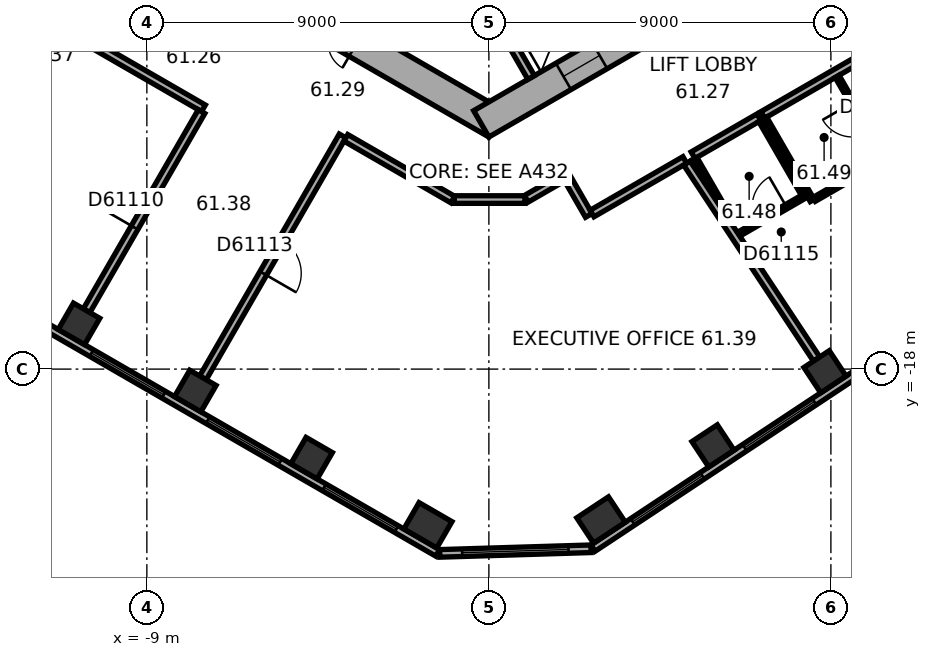
"""IFC4 building model, lengths in metres.
Left out: names, types, materials, properties, quantities, classifications, styles, units other than length and angle.
Written with IfcOpenShell. Run it as: python <this file> out.ifc"""

import sys

from ifc_helpers import new_model, si_unit, direction, frame, frame_2d, origin, origin_2d, place, context, subcontext, project, spatial, rectangle, extrude, element, fill, save


model = new_model("IFC4")
c1 = context("Model", 3, precision=1e-05, world=origin(), true_north=direction((0.0, 1.0)))
c2 = subcontext(c1, "Body", "Model", "MODEL_VIEW")
j1 = project(units=[si_unit("LENGTHUNIT", "METRE"), si_unit("PLANEANGLEUNIT", "RADIAN")], contexts=[c1])
p1 = place(None, origin())
s1 = spatial("IfcSite", under=j1, at=p1, CompositionType="ELEMENT")
p2 = place(p1, origin())
s2 = spatial("IfcBuilding", under=s1, at=p2, CompositionType="ELEMENT")
p3 = place(p2, frame((0.0, 0.0, 247.6)))
s3 = spatial("IfcBuildingStorey", under=s2, at=p3, CompositionType="ELEMENT", Elevation=247.6)
for number, where, z_axis, x_axis in (
    (1, (-10.785, -16.809, 0.0), (0.0, 0.0, 1.0), (0.866, -0.5, 0.0)),
    (2, (-7.725, -18.576, 0.0), (0.0, 0.0, 1.0), (0.866, -0.5, 0.0)),
    (3, (-4.665, -20.343, 0.0), (0.0, 0.0, 1.0), (0.866, -0.5, 0.0)),
):
    element("IfcColumn", number, at=place(p3, frame(where, z_axis=z_axis, x_axis=x_axis)), inside=s3, PredefinedType="COLUMN", context=c2, shape_type="SweptSolid", body=[
        extrude(rectangle(XDim=0.8, YDim=0.8, at=origin_2d()), origin(), (0.0, 0.0, 1.0), 3.7),
    ])
for number, where, z_axis, x_axis in (
    (4, (-1.604, -22.11, 0.0), (0.0, 0.0, 1.0), (0.866, -0.5, 0.0)),
    (5, (2.951, -21.971, 0.0), (0.0, 0.0, 1.0), (0.834, 0.552, 0.0)),
):
    element("IfcColumn", number, at=place(p3, frame(where, z_axis=z_axis, x_axis=x_axis)), inside=s3, PredefinedType="COLUMN", context=c2, shape_type="SweptSolid", body=[
        extrude(rectangle(XDim=1.0, YDim=0.8, at=origin_2d()), origin(), (0.0, 0.0, 1.0), 3.7),
    ])
for number, where, z_axis, x_axis in (
    (6, (5.898, -20.021, 0.0), (0.0, 0.0, 1.0), (0.834, 0.552, 0.0)),
    (7, (8.844, -18.07, 0.0), (0.0, 0.0, 1.0), (0.834, 0.552, 0.0)),
):
    element("IfcColumn", number, at=place(p3, frame(where, z_axis=z_axis, x_axis=x_axis)), inside=s3, PredefinedType="COLUMN", context=c2, shape_type="SweptSolid", body=[
        extrude(rectangle(XDim=0.8, YDim=0.8, at=origin_2d()), origin(), (0.0, 0.0, 1.0), 3.7),
    ])
p4 = place(p3, frame((-10.1, -5.6, 0.0), z_axis=(0.0, 0.0, 1.0), x_axis=(0.866023897231, -0.500002609418, 0.0)))
e8 = element("IfcWall", 8, at=p4, inside=s3, PredefinedType="SHEAR", context=c2, shape_type="SweptSolid", body=[
    extrude(rectangle(XDim=11.894, YDim=0.8, at=frame_2d((5.947, 0.0))), origin(), (0.0, 0.0, 1.0), 3.7),
])
p5 = place(p4, frame((6.147, 0.0, 0.0)))
e9 = element("IfcOpeningElement", 9, at=p5, cuts=e8, PredefinedType="OPENING", context=c2, shape_type="SweptSolid", body=[
    extrude(rectangle(XDim=1.5, YDim=2.1, at=frame_2d((0.75, 1.05))), frame((0.0, 0.41, 0.0), z_axis=(0.0, -1.0, 0.0), x_axis=(1.0, 0.0, 0.0)), (0.0, 0.0, 1.0), 0.82),
])
p6 = place(p4, frame((1.597, 0.0, 0.0)))
e10 = element("IfcOpeningElement", 10, at=p6, cuts=e8, PredefinedType="OPENING", context=c2, shape_type="SweptSolid", body=[
    extrude(rectangle(XDim=1.1, YDim=2.1, at=frame_2d((0.55, 1.05))), frame((0.0, 0.41, 0.0), z_axis=(0.0, -1.0, 0.0), x_axis=(1.0, 0.0, 0.0)), (0.0, 0.0, 1.0), 0.82),
])
p7 = place(p4, frame((4.197, 0.0, 0.0)))
e11 = element("IfcOpeningElement", 11, at=p7, cuts=e8, PredefinedType="OPENING", context=c2, shape_type="SweptSolid", body=[
    extrude(rectangle(XDim=1.1, YDim=2.1, at=frame_2d((0.55, 1.05))), frame((0.0, 0.41, 0.0), z_axis=(0.0, -1.0, 0.0), x_axis=(1.0, 0.0, 0.0)), (0.0, 0.0, 1.0), 0.82),
])
p8 = place(p3, frame((-0.2, -11.547, 0.0), z_axis=(0.0, 0.0, 1.0), x_axis=(0.866023897231, 0.500002609418, 0.0)))
e12 = element("IfcWall", 12, at=p8, inside=s3, PredefinedType="SHEAR", context=c2, shape_type="SweptSolid", body=[
    extrude(rectangle(XDim=11.894, YDim=0.8, at=frame_2d((5.947, 0.0))), origin(), (0.0, 0.0, 1.0), 3.7),
])
p9 = place(p8, frame((2.497, 0.0, 0.0)))
e13 = element("IfcOpeningElement", 13, at=p9, cuts=e12, PredefinedType="OPENING", context=c2, shape_type="SweptSolid", body=[
    extrude(rectangle(XDim=1.1, YDim=2.1, at=frame_2d((0.55, 1.05))), frame((0.0, 0.41, 0.0), z_axis=(0.0, -1.0, 0.0), x_axis=(1.0, 0.0, 0.0)), (0.0, 0.0, 1.0), 0.82),
])
p10 = place(p8, frame((5.097, 0.0, 0.0)))
e14 = element("IfcOpeningElement", 14, at=p10, cuts=e12, PredefinedType="OPENING", context=c2, shape_type="SweptSolid", body=[
    extrude(rectangle(XDim=1.1, YDim=2.1, at=frame_2d((0.55, 1.05))), frame((0.0, 0.41, 0.0), z_axis=(0.0, -1.0, 0.0), x_axis=(1.0, 0.0, 0.0)), (0.0, 0.0, 1.0), 0.82),
])
p11 = place(p8, frame((7.697, 0.0, 0.0)))
e15 = element("IfcOpeningElement", 15, at=p11, cuts=e12, PredefinedType="OPENING", context=c2, shape_type="SweptSolid", body=[
    extrude(rectangle(XDim=1.1, YDim=2.1, at=frame_2d((0.55, 1.05))), frame((0.0, 0.41, 0.0), z_axis=(0.0, -1.0, 0.0), x_axis=(1.0, 0.0, 0.0)), (0.0, 0.0, 1.0), 0.82),
])
p12 = place(p3, frame((-17.664, -13.415, 0.0), z_axis=(0.0, 0.0, 1.0), x_axis=(0.866026555358, -0.49999800541, 0.0)))
e16 = element("IfcWall", 16, at=p12, inside=s3, PredefinedType="STANDARD", context=c2, shape_type="SweptSolid", body=[
    extrude(rectangle(XDim=18.841, YDim=0.2, at=frame_2d((9.421, 0.0))), origin(), (0.0, 0.0, 1.0), 3.7),
])
p13 = place(p12, frame((1.254, 0.0, 0.9)))
e17 = element("IfcOpeningElement", 17, at=p13, cuts=e16, PredefinedType="OPENING", context=c2, shape_type="SweptSolid", body=[
    extrude(rectangle(XDim=2.2, YDim=2.0, at=frame_2d((1.1, 1.0))), frame((0.0, 0.11, 0.0), z_axis=(0.0, -1.0, 0.0), x_axis=(1.0, 0.0, 0.0)), (0.0, 0.0, 1.0), 0.22),
])
p14 = place(p12, frame((4.788, 0.0, 0.9)))
e18 = element("IfcOpeningElement", 18, at=p14, cuts=e16, PredefinedType="OPENING", context=c2, shape_type="SweptSolid", body=[
    extrude(rectangle(XDim=2.2, YDim=2.0, at=frame_2d((1.1, 1.0))), frame((0.0, 0.11, 0.0), z_axis=(0.0, -1.0, 0.0), x_axis=(1.0, 0.0, 0.0)), (0.0, 0.0, 1.0), 0.22),
])
p15 = place(p12, frame((8.322, 0.0, 0.9)))
e19 = element("IfcOpeningElement", 19, at=p15, cuts=e16, PredefinedType="OPENING", context=c2, shape_type="SweptSolid", body=[
    extrude(rectangle(XDim=2.2, YDim=2.0, at=frame_2d((1.1, 1.0))), frame((0.0, 0.11, 0.0), z_axis=(0.0, -1.0, 0.0), x_axis=(1.0, 0.0, 0.0)), (0.0, 0.0, 1.0), 0.22),
])
p16 = place(p12, frame((11.855, 0.0, 0.9)))
e20 = element("IfcOpeningElement", 20, at=p16, cuts=e16, PredefinedType="OPENING", context=c2, shape_type="SweptSolid", body=[
    extrude(rectangle(XDim=2.2, YDim=2.0, at=frame_2d((1.1, 1.0))), frame((0.0, 0.11, 0.0), z_axis=(0.0, -1.0, 0.0), x_axis=(1.0, 0.0, 0.0)), (0.0, 0.0, 1.0), 0.22),
])
p17 = place(p12, frame((15.389, 0.0, 0.9)))
e21 = element("IfcOpeningElement", 21, at=p17, cuts=e16, PredefinedType="OPENING", context=c2, shape_type="SweptSolid", body=[
    extrude(rectangle(XDim=2.2, YDim=2.0, at=frame_2d((1.1, 1.0))), frame((0.0, 0.11, 0.0), z_axis=(0.0, -1.0, 0.0), x_axis=(1.0, 0.0, 0.0)), (0.0, 0.0, 1.0), 0.22),
])
p18 = place(p3, frame((-1.294, -22.849, 0.0), z_axis=(0.0, 0.0, 1.0), x_axis=(0.999533952558, 0.030526671678, 0.0)))
e22 = element("IfcWall", 22, at=p18, inside=s3, PredefinedType="STANDARD", context=c2, shape_type="SweptSolid", body=[
    extrude(rectangle(XDim=3.983, YDim=0.2, at=frame_2d((1.991, 0.0))), origin(), (0.0, 0.0, 1.0), 3.7),
])
p19 = place(p18, frame((0.591, 0.0, 0.9)))
e23 = element("IfcOpeningElement", 23, at=p19, cuts=e22, PredefinedType="OPENING", context=c2, shape_type="SweptSolid", body=[
    extrude(rectangle(XDim=2.8, YDim=2.0, at=frame_2d((1.4, 1.0))), frame((0.0, 0.11, 0.0), z_axis=(0.0, -1.0, 0.0), x_axis=(1.0, 0.0, 0.0)), (0.0, 0.0, 1.0), 0.22),
])
p20 = place(p3, frame((2.739, -22.711, 0.0), z_axis=(0.0, 0.0, 1.0), x_axis=(0.833885723098, 0.551937134838, 0.0)))
e24 = element("IfcWall", 24, at=p20, inside=s3, PredefinedType="STANDARD", context=c2, shape_type="SweptSolid", body=[
    extrude(rectangle(XDim=18.841, YDim=0.2, at=frame_2d((9.421, 0.0))), origin(), (0.0, 0.0, 1.0), 3.7),
])
p21 = place(p20, frame((1.252, 0.0, 0.9)))
e25 = element("IfcOpeningElement", 25, at=p21, cuts=e24, PredefinedType="OPENING", context=c2, shape_type="SweptSolid", body=[
    extrude(rectangle(XDim=2.2, YDim=2.0, at=frame_2d((1.1, 1.0))), frame((0.0, 0.11, 0.0), z_axis=(0.0, -1.0, 0.0), x_axis=(1.0, 0.0, 0.0)), (0.0, 0.0, 1.0), 0.22),
])
p22 = place(p20, frame((4.786, 0.0, 0.9)))
e26 = element("IfcOpeningElement", 26, at=p22, cuts=e24, PredefinedType="OPENING", context=c2, shape_type="SweptSolid", body=[
    extrude(rectangle(XDim=2.2, YDim=2.0, at=frame_2d((1.1, 1.0))), frame((0.0, 0.11, 0.0), z_axis=(0.0, -1.0, 0.0), x_axis=(1.0, 0.0, 0.0)), (0.0, 0.0, 1.0), 0.22),
])
p23 = place(p20, frame((8.32, 0.0, 0.9)))
e27 = element("IfcOpeningElement", 27, at=p23, cuts=e24, PredefinedType="OPENING", context=c2, shape_type="SweptSolid", body=[
    extrude(rectangle(XDim=2.2, YDim=2.0, at=frame_2d((1.1, 1.0))), frame((0.0, 0.11, 0.0), z_axis=(0.0, -1.0, 0.0), x_axis=(1.0, 0.0, 0.0)), (0.0, 0.0, 1.0), 0.22),
])
p24 = place(p20, frame((11.854, 0.0, 0.9)))
e28 = element("IfcOpeningElement", 28, at=p24, cuts=e24, PredefinedType="OPENING", context=c2, shape_type="SweptSolid", body=[
    extrude(rectangle(XDim=2.2, YDim=2.0, at=frame_2d((1.1, 1.0))), frame((0.0, 0.11, 0.0), z_axis=(0.0, -1.0, 0.0), x_axis=(1.0, 0.0, 0.0)), (0.0, 0.0, 1.0), 0.22),
])
p25 = place(p20, frame((15.387, 0.0, 0.9)))
e29 = element("IfcOpeningElement", 29, at=p25, cuts=e24, PredefinedType="OPENING", context=c2, shape_type="SweptSolid", body=[
    extrude(rectangle(XDim=2.2, YDim=2.0, at=frame_2d((1.1, 1.0))), frame((0.0, 0.11, 0.0), z_axis=(0.0, -1.0, 0.0), x_axis=(1.0, 0.0, 0.0)), (0.0, 0.0, 1.0), 0.22),
])
p26 = place(p3, frame((0.013, -8.422, 0.0), z_axis=(0.0, 0.0, 1.0), x_axis=(0.500077893725, -0.86598042715, 0.0)))
e30 = element("IfcWall", 30, at=p26, inside=s3, PredefinedType="PARTITIONING", context=c2, shape_type="SweptSolid", body=[
    extrude(rectangle(XDim=2.2, YDim=0.2, at=frame_2d((1.1, 0.0))), origin(), (0.0, 0.0, 1.0), 3.42),
])
p27 = place(p3, frame((-11.551, -8.805, 0.0), z_axis=(0.0, 0.0, 1.0), x_axis=(0.866038310922, -0.499977643516, 0.0)))
e31 = element("IfcWall", 31, at=p27, inside=s3, PredefinedType="PARTITIONING", context=c2, shape_type="SweptSolid", body=[
    extrude(rectangle(XDim=4.665, YDim=0.2, at=frame_2d((2.333, 0.0))), origin(), (0.0, 0.0, 1.0), 3.42),
])
p28 = place(p3, frame((-10.585, -16.463, 0.0), z_axis=(0.0, 0.0, 1.0), x_axis=(0.499993802756, 0.866028981735, 0.0)))
e32 = element("IfcWall", 32, at=p28, inside=s3, PredefinedType="PARTITIONING", context=c2, shape_type="SweptSolid", body=[
    extrude(rectangle(XDim=6.049, YDim=0.2, at=frame_2d((3.024, 0.0))), origin(), (0.0, 0.0, 1.0), 2.87),
])
p29 = place(p28, frame((2.524, 0.0, 0.0)))
e33 = element("IfcOpeningElement", 33, at=p29, cuts=e32, PredefinedType="OPENING", context=c2, shape_type="SweptSolid", body=[
    extrude(rectangle(XDim=1.0, YDim=2.1, at=frame_2d((0.5, 1.05))), frame((0.0, 0.11, 0.0), z_axis=(0.0, -1.0, 0.0), x_axis=(1.0, 0.0, 0.0)), (0.0, 0.0, 1.0), 0.22),
])
p30 = place(p3, frame((-7.525, -18.23, 0.0), z_axis=(0.0, 0.0, 1.0), x_axis=(0.499983153418, 0.866035129944, 0.0)))
e34 = element("IfcWall", 34, at=p30, inside=s3, PredefinedType="PARTITIONING", context=c2, shape_type="SweptSolid", body=[
    extrude(rectangle(XDim=7.35, YDim=0.2, at=frame_2d((3.675, 0.0))), origin(), (0.0, 0.0, 1.0), 3.42),
])
p31 = place(p30, frame((3.175, 0.0, 0.0)))
e35 = element("IfcOpeningElement", 35, at=p31, cuts=e34, PredefinedType="OPENING", context=c2, shape_type="SweptSolid", body=[
    extrude(rectangle(XDim=1.0, YDim=2.1, at=frame_2d((0.5, 1.05))), frame((0.0, 0.11, 0.0), z_axis=(0.0, -1.0, 0.0), x_axis=(1.0, 0.0, 0.0)), (0.0, 0.0, 1.0), 0.22),
])
p32 = place(p3, frame((-3.763, -11.915, 0.0), z_axis=(0.0, 0.0, 1.0), x_axis=(0.866037915695, -0.499978328108, 0.0)))
e36 = element("IfcWall", 36, at=p32, inside=s3, PredefinedType="PARTITIONING", context=c2, shape_type="SweptSolid", body=[
    extrude(rectangle(XDim=3.249, YDim=0.2, at=frame_2d((1.625, 0.0))), origin(), (0.0, 0.0, 1.0), 3.42),
])
p33 = place(p3, frame((-0.91, -13.539, 0.0), z_axis=(0.0, 0.0, 1.0), x_axis=(1.0, 0.0, 0.0)))
e37 = element("IfcWall", 37, at=p33, inside=s3, PredefinedType="PARTITIONING", context=c2, shape_type="SweptSolid", body=[
    extrude(rectangle(XDim=1.86, YDim=0.2, at=frame_2d((0.93, 0.0))), origin(), (0.0, 0.0, 1.0), 3.42),
])
p34 = place(p3, frame((0.985, -13.519, 0.0), z_axis=(0.0, 0.0, 1.0), x_axis=(0.866054082991, 0.499950322867, 0.0)))
e38 = element("IfcWall", 38, at=p34, inside=s3, PredefinedType="PARTITIONING", context=c2, shape_type="SweptSolid", body=[
    extrude(rectangle(XDim=1.206, YDim=0.2, at=frame_2d((0.603, 0.0))), origin(), (0.0, 0.0, 1.0), 3.42),
])
p35 = place(p3, frame((2.079, -13.003, 0.0), z_axis=(0.0, 0.0, 1.0), x_axis=(0.500074377092, -0.865982457891, 0.0)))
e39 = element("IfcWall", 39, at=p35, inside=s3, PredefinedType="PARTITIONING", context=c2, shape_type="SweptSolid", body=[
    extrude(rectangle(XDim=1.101, YDim=0.2, at=frame_2d((0.55, 0.0))), origin(), (0.0, 0.0, 1.0), 3.42),
])
p36 = place(p3, frame((2.716, -13.906, 0.0), z_axis=(0.0, 0.0, 1.0), x_axis=(0.866048512801, 0.499959971872, 0.0)))
e40 = element("IfcWall", 40, at=p36, inside=s3, PredefinedType="PARTITIONING", context=c2, shape_type="SweptSolid", body=[
    extrude(rectangle(XDim=2.818, YDim=0.2, at=frame_2d((1.409, 0.0))), origin(), (0.0, 0.0, 1.0), 3.42),
])
p37 = place(p3, frame((5.373, -12.372, 0.0), z_axis=(0.0, 0.0, 1.0), x_axis=(0.866010750942, 0.50002537861, 0.0)))
e41 = element("IfcWall", 41, at=p37, inside=s3, PredefinedType="PARTITIONING", context=c2, shape_type="SweptSolid", body=[
    extrude(rectangle(XDim=2.0, YDim=0.2, at=frame_2d((1.0, 0.0))), origin(), (0.0, 0.0, 1.0), 3.42),
])
p38 = place(p3, frame((6.107, -13.644, 0.0), z_axis=(0.0, 0.0, 1.0), x_axis=(-0.500072492706, 0.865983546056, 0.0)))
e42 = element("IfcWall", 42, at=p38, inside=s3, PredefinedType="PARTITIONING", context=c2, shape_type="SweptSolid", body=[
    extrude(rectangle(XDim=1.368, YDim=0.12, at=frame_2d((0.684, 0.0))), origin(), (0.0, 0.0, 1.0), 3.42),
])
p39 = place(p3, frame((7.155, -11.459, 0.0), z_axis=(0.0, 0.0, 1.0), x_axis=(0.500077740698, -0.865980515519, 0.0)))
e43 = element("IfcWall", 43, at=p39, inside=s3, PredefinedType="PARTITIONING", context=c2, shape_type="SweptSolid", body=[
    extrude(rectangle(XDim=2.3, YDim=0.12, at=frame_2d((1.15, 0.0))), origin(), (0.0, 0.0, 1.0), 3.42),
])
p40 = place(p3, frame((7.208, -11.312, 0.0), z_axis=(0.0, 0.0, 1.0), x_axis=(0.866050243185, 0.499956974429, 0.0)))
e44 = element("IfcWall", 44, at=p40, inside=s3, PredefinedType="PARTITIONING", context=c2, shape_type="SweptSolid", body=[
    extrude(rectangle(XDim=3.514, YDim=0.2, at=frame_2d((1.757, 0.0))), origin(), (0.0, 0.0, 1.0), 3.42),
])
p41 = place(p3, frame((8.253, -13.481, 0.0), z_axis=(0.0, 0.0, 1.0), x_axis=(-0.866045024864, -0.499966013754, 0.0)))
e45 = element("IfcWall", 45, at=p41, inside=s3, PredefinedType="PARTITIONING", context=c2, shape_type="SweptSolid", body=[
    extrude(rectangle(XDim=1.88, YDim=0.12, at=frame_2d((0.94, 0.0))), origin(), (0.0, 0.0, 1.0), 3.42),
])
p42 = place(p41, frame((0.49, 0.0, 0.0)))
e46 = element("IfcOpeningElement", 46, at=p42, cuts=e45, PredefinedType="OPENING", context=c2, shape_type="SweptSolid", body=[
    extrude(rectangle(XDim=0.9, YDim=2.1, at=frame_2d((0.45, 1.05))), frame((0.0, 0.07, 0.0), z_axis=(0.0, -1.0, 0.0), x_axis=(1.0, 0.0, 0.0)), (0.0, 0.0, 1.0), 0.14),
])
p43 = place(p3, frame((8.509, -13.564, 0.0), z_axis=(0.0, 0.0, 1.0), x_axis=(-0.500004234368, 0.866022959057, 0.0)))
e47 = element("IfcWall", 47, at=p43, inside=s3, PredefinedType="PARTITIONING", context=c2, shape_type="SweptSolid", body=[
    extrude(rectangle(XDim=2.5, YDim=0.12, at=frame_2d((1.25, 0.0))), origin(), (0.0, 0.0, 1.0), 3.42),
])
p44 = place(p3, frame((8.624, -17.737, 0.0), z_axis=(0.0, 0.0, 1.0), x_axis=(-0.551945242328, 0.833880356809, 0.0)))
e48 = element("IfcWall", 48, at=p44, inside=s3, PredefinedType="PARTITIONING", context=c2, shape_type="SweptSolid", body=[
    extrude(rectangle(XDim=6.183, YDim=0.2, at=frame_2d((3.091, 0.0))), origin(), (0.0, 0.0, 1.0), 2.87),
])
p45 = place(p3, frame((9.164, -10.299, 0.0), z_axis=(0.0, 0.0, 1.0), x_axis=(0.500004234368, -0.866022959057, 0.0)))
e49 = element("IfcWall", 49, at=p45, inside=s3, PredefinedType="PARTITIONING", context=c2, shape_type="SweptSolid", body=[
    extrude(rectangle(XDim=2.5, YDim=0.12, at=frame_2d((1.25, 0.0))), origin(), (0.0, 0.0, 1.0), 3.42),
])
p46 = place(p45, frame((0.8, 0.0, 0.0)))
e50 = element("IfcOpeningElement", 50, at=p46, cuts=e49, PredefinedType="OPENING", context=c2, shape_type="SweptSolid", body=[
    extrude(rectangle(XDim=0.9, YDim=2.1, at=frame_2d((0.45, 1.05))), frame((0.0, 0.07, 0.0), z_axis=(0.0, -1.0, 0.0), x_axis=(1.0, 0.0, 0.0)), (0.0, 0.0, 1.0), 0.14),
])
p47 = place(p3, frame((10.362, -12.494, 0.0), z_axis=(0.0, 0.0, 1.0), x_axis=(-0.866009661879, -0.500027264788, 0.0)))
e51 = element("IfcWall", 51, at=p47, inside=s3, PredefinedType="PARTITIONING", context=c2, shape_type="SweptSolid", body=[
    extrude(rectangle(XDim=2.08, YDim=0.12, at=frame_2d((1.04, 0.0))), origin(), (0.0, 0.0, 1.0), 3.42),
])
p48 = place(p15, origin())
e52 = element("IfcWindow", 52, at=p48, inside=s3, PartitioningType="SINGLE_PANEL", PredefinedType="WINDOW", context=c2, shape_type="SweptSolid", body=[
    extrude(rectangle(XDim=2.2, YDim=2.0, at=frame_2d((1.1, 1.0))), frame((0.0, 0.03, 0.0), z_axis=(0.0, -1.0, 0.0), x_axis=(1.0, 0.0, 0.0)), (0.0, 0.0, 1.0), 0.06),
])
fill(e19, e52)
p49 = place(p16, origin())
e53 = element("IfcWindow", 53, at=p49, inside=s3, PartitioningType="SINGLE_PANEL", PredefinedType="WINDOW", context=c2, shape_type="SweptSolid", body=[
    extrude(rectangle(XDim=2.2, YDim=2.0, at=frame_2d((1.1, 1.0))), frame((0.0, 0.03, 0.0), z_axis=(0.0, -1.0, 0.0), x_axis=(1.0, 0.0, 0.0)), (0.0, 0.0, 1.0), 0.06),
])
fill(e20, e53)
p50 = place(p17, origin())
e54 = element("IfcWindow", 54, at=p50, inside=s3, PartitioningType="SINGLE_PANEL", PredefinedType="WINDOW", context=c2, shape_type="SweptSolid", body=[
    extrude(rectangle(XDim=2.2, YDim=2.0, at=frame_2d((1.1, 1.0))), frame((0.0, 0.03, 0.0), z_axis=(0.0, -1.0, 0.0), x_axis=(1.0, 0.0, 0.0)), (0.0, 0.0, 1.0), 0.06),
])
fill(e21, e54)
p51 = place(p19, origin())
e55 = element("IfcWindow", 55, at=p51, inside=s3, PartitioningType="SINGLE_PANEL", PredefinedType="WINDOW", context=c2, shape_type="SweptSolid", body=[
    extrude(rectangle(XDim=2.8, YDim=2.0, at=frame_2d((1.4, 1.0))), frame((0.0, 0.03, 0.0), z_axis=(0.0, -1.0, 0.0), x_axis=(1.0, 0.0, 0.0)), (0.0, 0.0, 1.0), 0.06),
])
fill(e23, e55)
p52 = place(p21, origin())
e56 = element("IfcWindow", 56, at=p52, inside=s3, PartitioningType="SINGLE_PANEL", PredefinedType="WINDOW", context=c2, shape_type="SweptSolid", body=[
    extrude(rectangle(XDim=2.2, YDim=2.0, at=frame_2d((1.1, 1.0))), frame((0.0, 0.03, 0.0), z_axis=(0.0, -1.0, 0.0), x_axis=(1.0, 0.0, 0.0)), (0.0, 0.0, 1.0), 0.06),
])
fill(e25, e56)
p53 = place(p22, origin())
e57 = element("IfcWindow", 57, at=p53, inside=s3, PartitioningType="SINGLE_PANEL", PredefinedType="WINDOW", context=c2, shape_type="SweptSolid", body=[
    extrude(rectangle(XDim=2.2, YDim=2.0, at=frame_2d((1.1, 1.0))), frame((0.0, 0.03, 0.0), z_axis=(0.0, -1.0, 0.0), x_axis=(1.0, 0.0, 0.0)), (0.0, 0.0, 1.0), 0.06),
])
fill(e26, e57)
p54 = place(p9, origin())
e58 = element("IfcDoor", 58, at=p54, inside=s3, OperationType="DOUBLE_DOOR_SLIDING", PredefinedType="DOOR", context=c2, shape_type="SweptSolid", body=[
    extrude(rectangle(XDim=1.1, YDim=2.1, at=frame_2d((0.55, 1.05))), frame((0.0, 0.025, 0.0), z_axis=(0.0, -1.0, 0.0), x_axis=(1.0, 0.0, 0.0)), (0.0, 0.0, 1.0), 0.05),
])
fill(e13, e58)
p55 = place(p29, origin())
e59 = element("IfcDoor", 59, at=p55, inside=s3, OperationType="SINGLE_SWING_LEFT", PredefinedType="DOOR", context=c2, shape_type="SweptSolid", body=[
    extrude(rectangle(XDim=1.0, YDim=2.1, at=frame_2d((0.5, 1.05))), frame((0.0, 0.025, 0.0), z_axis=(0.0, -1.0, 0.0), x_axis=(1.0, 0.0, 0.0)), (0.0, 0.0, 1.0), 0.05),
])
fill(e33, e59)
p56 = place(p31, origin())
e60 = element("IfcDoor", 60, at=p56, inside=s3, OperationType="SINGLE_SWING_LEFT", PredefinedType="DOOR", context=c2, shape_type="SweptSolid", body=[
    extrude(rectangle(XDim=1.0, YDim=2.1, at=frame_2d((0.5, 1.05))), frame((0.0, 0.025, 0.0), z_axis=(0.0, -1.0, 0.0), x_axis=(1.0, 0.0, 0.0)), (0.0, 0.0, 1.0), 0.05),
])
fill(e35, e60)
p57 = place(p42, origin())
e61 = element("IfcDoor", 61, at=p57, inside=s3, OperationType="SINGLE_SWING_LEFT", PredefinedType="DOOR", context=c2, shape_type="SweptSolid", body=[
    extrude(rectangle(XDim=0.9, YDim=2.1, at=frame_2d((0.45, 1.05))), frame((0.0, 0.025, 0.0), z_axis=(0.0, -1.0, 0.0), x_axis=(1.0, 0.0, 0.0)), (0.0, 0.0, 1.0), 0.05),
])
fill(e46, e61)
save(model, sys.argv[1])
